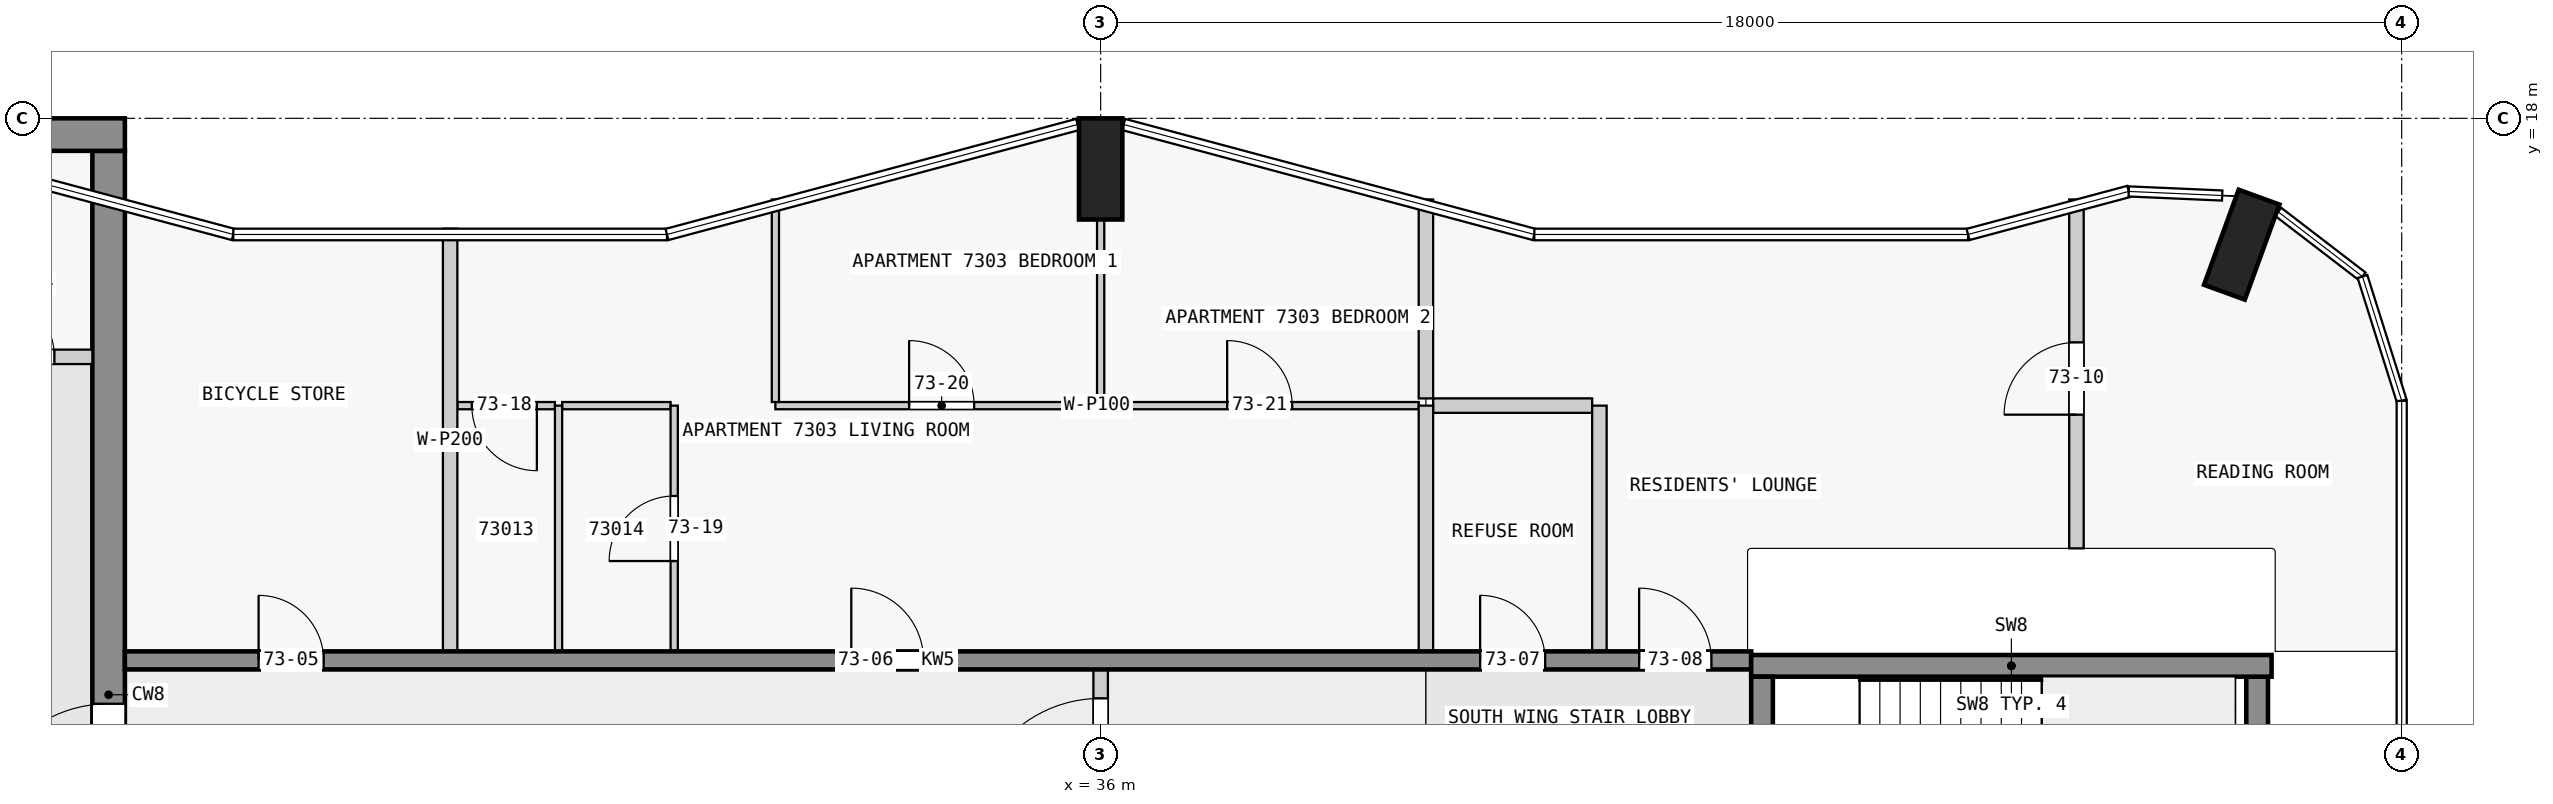
"""IFC4 building model, lengths in metres.
Left out: names, types, materials, properties, quantities, classifications, styles, units other than length and angle.
Written with IfcOpenShell. Run it as: python <this file> out.ifc"""

import sys

from ifc_helpers import new_model, si_unit, direction, frame, frame_2d, origin, origin_2d, place, context, subcontext, project, spatial, rectangle, extrude, element, fill, save


model = new_model("IFC4")
c1 = context("Model", 3, precision=1e-05, world=origin(), true_north=direction((0.0, 1.0)))
c2 = subcontext(c1, "Body", "Model", "MODEL_VIEW")
j1 = project(units=[si_unit("LENGTHUNIT", "METRE"), si_unit("PLANEANGLEUNIT", "RADIAN")], contexts=[c1])
p1 = place(None, origin())
s1 = spatial("IfcSite", under=j1, at=p1, CompositionType="ELEMENT")
p2 = place(p1, origin())
s2 = spatial("IfcBuilding", under=s1, at=p2, CompositionType="ELEMENT")
p3 = place(p2, frame((0.0, 0.0, 277.4)))
s3 = spatial("IfcBuildingStorey", under=s2, at=p3, CompositionType="ELEMENT", Elevation=277.4)
for number, where, z_axis, x_axis in (
    (1, (51.787, 16.252, 0.0), (0.0, 0.0, 1.0), (-0.94, 0.342, 0.0)),
    (2, (36.0, 17.3, 0.0), (0.0, 0.0, 1.0), (1.0, 0.0, 0.0)),
):
    element("IfcColumn", number, at=place(p3, frame(where, z_axis=z_axis, x_axis=x_axis)), inside=s3, PredefinedType="COLUMN", context=c2, shape_type="SweptSolid", body=[
        extrude(rectangle(XDim=0.6, YDim=1.4, at=origin_2d()), origin(), (0.0, 0.0, 1.0), 3.5),
    ])
p4 = place(p3, frame((1.85, 17.775, 0.0), z_axis=(0.0, 0.0, 1.0), x_axis=(1.0, 0.0, 0.0)))
e3 = element("IfcWall", 3, at=p4, inside=s3, PredefinedType="SHEAR", context=c2, shape_type="SweptSolid", body=[
    extrude(rectangle(XDim=20.65, YDim=0.45, at=frame_2d((10.325, 0.0))), origin(), (0.0, 0.0, 1.0), 3.25),
])
p5 = place(p3, frame((22.275, 2.5, 0.0), z_axis=(0.0, 0.0, 1.0), x_axis=(0.0, 1.0, 0.0)))
e4 = element("IfcWall", 4, at=p5, inside=s3, PredefinedType="SHEAR", context=c2, shape_type="SweptSolid", body=[
    extrude(rectangle(XDim=15.05, YDim=0.45, at=frame_2d((7.525, 0.0))), origin(), (0.0, 0.0, 1.0), 3.25),
])
p6 = place(p5, frame((5.6, 0.0, 0.0)))
e5 = element("IfcOpeningElement", 5, at=p6, cuts=e4, PredefinedType="OPENING", context=c2, shape_type="SweptSolid", body=[
    extrude(rectangle(XDim=1.8, YDim=2.1, at=frame_2d((0.9, 1.05))), frame((0.0, 0.235, 0.0), z_axis=(0.0, -1.0, 0.0), x_axis=(1.0, 0.0, 0.0)), (0.0, 0.0, 1.0), 0.47),
])
p7 = place(p3, frame((45.15, 7.725, 0.0), z_axis=(0.0, 0.0, 1.0), x_axis=(0.0, 1.0, 0.0)))
e6 = element("IfcWall", 6, at=p7, inside=s3, PredefinedType="SHEAR", context=c2, shape_type="SweptSolid", body=[
    extrude(rectangle(XDim=2.55, YDim=0.3, at=frame_2d((1.275, 0.0))), origin(), (0.0, 0.0, 1.0), 3.5),
])
p8 = place(p7, frame((0.725, 0.0, 0.0)))
e7 = element("IfcOpeningElement", 7, at=p8, cuts=e6, PredefinedType="OPENING", context=c2, shape_type="SweptSolid", body=[
    extrude(rectangle(XDim=1.1, YDim=2.1, at=frame_2d((0.55, 1.05))), frame((0.0, 0.16, 0.0), z_axis=(0.0, -1.0, 0.0), x_axis=(1.0, 0.0, 0.0)), (0.0, 0.0, 1.0), 0.32),
])
p9 = place(p3, frame((52.0, 7.725, 0.0), z_axis=(0.0, 0.0, 1.0), x_axis=(0.0, 1.0, 0.0)))
e8 = element("IfcWall", 8, at=p9, inside=s3, PredefinedType="SHEAR", context=c2, shape_type="SweptSolid", body=[
    extrude(rectangle(XDim=2.55, YDim=0.3, at=frame_2d((1.275, 0.0))), origin(), (0.0, 0.0, 1.0), 3.5),
])
p10 = place(p3, frame((45.0, 10.425, 0.0), z_axis=(0.0, 0.0, 1.0), x_axis=(1.0, 0.0, 0.0)))
e9 = element("IfcWall", 9, at=p10, inside=s3, PredefinedType="SHEAR", context=c2, shape_type="SweptSolid", body=[
    extrude(rectangle(XDim=7.2, YDim=0.3, at=frame_2d((3.6, 0.0))), origin(), (0.0, 0.0, 1.0), 3.5),
])
p11 = place(p3, frame((22.5, 10.5, 0.0), z_axis=(0.0, 0.0, 1.0), x_axis=(1.0, 0.0, 0.0)))
e10 = element("IfcWall", 10, at=p11, inside=s3, PredefinedType="SHEAR", context=c2, shape_type="SweptSolid", body=[
    extrude(rectangle(XDim=22.5, YDim=0.25, at=frame_2d((11.25, 0.0))), origin(), (0.0, 0.0, 1.0), 3.25),
])
p12 = place(p11, frame((1.85, 0.0, 0.0)))
e11 = element("IfcOpeningElement", 11, at=p12, cuts=e10, PredefinedType="OPENING", context=c2, shape_type="SweptSolid", body=[
    extrude(rectangle(XDim=0.9, YDim=2.1, at=frame_2d((0.45, 1.05))), frame((0.0, 0.135, 0.0), z_axis=(0.0, -1.0, 0.0), x_axis=(1.0, 0.0, 0.0)), (0.0, 0.0, 1.0), 0.27),
])
p13 = place(p11, frame((10.05, 0.0, 0.0)))
e12 = element("IfcOpeningElement", 12, at=p13, cuts=e10, PredefinedType="OPENING", context=c2, shape_type="SweptSolid", body=[
    extrude(rectangle(XDim=1.0, YDim=2.1, at=frame_2d((0.5, 1.05))), frame((0.0, 0.135, 0.0), z_axis=(0.0, -1.0, 0.0), x_axis=(1.0, 0.0, 0.0)), (0.0, 0.0, 1.0), 0.27),
])
p14 = place(p11, frame((18.75, 0.0, 0.0)))
e13 = element("IfcOpeningElement", 13, at=p14, cuts=e10, PredefinedType="OPENING", context=c2, shape_type="SweptSolid", body=[
    extrude(rectangle(XDim=0.9, YDim=2.1, at=frame_2d((0.45, 1.05))), frame((0.0, 0.135, 0.0), z_axis=(0.0, -1.0, 0.0), x_axis=(1.0, 0.0, 0.0)), (0.0, 0.0, 1.0), 0.27),
])
p15 = place(p11, frame((20.95, 0.0, 0.0)))
e14 = element("IfcOpeningElement", 14, at=p15, cuts=e10, PredefinedType="OPENING", context=c2, shape_type="SweptSolid", body=[
    extrude(rectangle(XDim=1.0, YDim=2.1, at=frame_2d((0.5, 1.05))), frame((0.0, 0.135, 0.0), z_axis=(0.0, -1.0, 0.0), x_axis=(1.0, 0.0, 0.0)), (0.0, 0.0, 1.0), 0.27),
])
p16 = place(p3, frame((18.6, 14.7, 0.0), z_axis=(0.0, 0.0, 1.0), x_axis=(1.0, 0.0, 0.0)))
e15 = element("IfcWall", 15, at=p16, inside=s3, PredefinedType="PARTITIONING", context=c2, shape_type="SweptSolid", body=[
    extrude(rectangle(XDim=3.45, YDim=0.2, at=frame_2d((1.725, 0.0))), origin(), (0.0, 0.0, 1.0), 3.25),
])
p17 = place(p16, frame((0.3, 0.0, 0.0)))
e16 = element("IfcOpeningElement", 16, at=p17, cuts=e15, PredefinedType="OPENING", context=c2, shape_type="SweptSolid", body=[
    extrude(rectangle(XDim=0.9, YDim=2.1, at=frame_2d((0.45, 1.05))), frame((0.0, 0.11, 0.0), z_axis=(0.0, -1.0, 0.0), x_axis=(1.0, 0.0, 0.0)), (0.0, 0.0, 1.0), 0.22),
])
p18 = place(p16, frame((2.025, 0.0, 0.0)))
e17 = element("IfcOpeningElement", 17, at=p18, cuts=e15, PredefinedType="OPENING", context=c2, shape_type="SweptSolid", body=[
    extrude(rectangle(XDim=0.9, YDim=2.1, at=frame_2d((0.45, 1.05))), frame((0.0, 0.11, 0.0), z_axis=(0.0, -1.0, 0.0), x_axis=(1.0, 0.0, 0.0)), (0.0, 0.0, 1.0), 0.22),
])
p19 = place(p3, frame((28.45, 14.025, 0.0), z_axis=(0.0, 0.0, 1.0), x_axis=(-1.0, 0.0, 0.0)))
e18 = element("IfcWall", 18, at=p19, inside=s3, PredefinedType="PARTITIONING", context=c2, shape_type="SweptSolid", body=[
    extrude(rectangle(XDim=1.35, YDim=0.1, at=frame_2d((0.675, 0.0))), origin(), (0.0, 0.0, 1.0), 3.25),
])
p20 = place(p19, frame((0.25, 0.0, 0.0)))
e19 = element("IfcOpeningElement", 19, at=p20, cuts=e18, PredefinedType="OPENING", context=c2, shape_type="SweptSolid", body=[
    extrude(rectangle(XDim=0.9, YDim=2.1, at=frame_2d((0.45, 1.05))), frame((0.0, 0.06, 0.0), z_axis=(0.0, -1.0, 0.0), x_axis=(1.0, 0.0, 0.0)), (0.0, 0.0, 1.0), 0.12),
])
p21 = place(p3, frame((30.05, 14.025, 0.0), z_axis=(0.0, 0.0, 1.0), x_axis=(-1.0, 0.0, 0.0)))
e20 = element("IfcWall", 20, at=p21, inside=s3, PredefinedType="PARTITIONING", context=c2, shape_type="SweptSolid", body=[
    extrude(rectangle(XDim=1.5, YDim=0.1, at=frame_2d((0.75, 0.0))), origin(), (0.0, 0.0, 1.0), 3.25),
])
p22 = place(p3, frame((31.5, 14.025, 0.0), z_axis=(0.0, 0.0, 1.0), x_axis=(1.0, 0.0, 0.0)))
e21 = element("IfcWall", 21, at=p22, inside=s3, PredefinedType="PARTITIONING", context=c2, shape_type="SweptSolid", body=[
    extrude(rectangle(XDim=8.9, YDim=0.1, at=frame_2d((4.45, 0.0))), origin(), (0.0, 0.0, 1.0), 3.25),
])
p23 = place(p22, frame((1.85, 0.0, 0.0)))
e22 = element("IfcOpeningElement", 22, at=p23, cuts=e21, PredefinedType="OPENING", context=c2, shape_type="SweptSolid", body=[
    extrude(rectangle(XDim=0.9, YDim=2.1, at=frame_2d((0.45, 1.05))), frame((0.0, 0.06, 0.0), z_axis=(0.0, -1.0, 0.0), x_axis=(1.0, 0.0, 0.0)), (0.0, 0.0, 1.0), 0.12),
])
p24 = place(p22, frame((6.25, 0.0, 0.0)))
e23 = element("IfcOpeningElement", 23, at=p24, cuts=e21, PredefinedType="OPENING", context=c2, shape_type="SweptSolid", body=[
    extrude(rectangle(XDim=0.9, YDim=2.1, at=frame_2d((0.45, 1.05))), frame((0.0, 0.06, 0.0), z_axis=(0.0, -1.0, 0.0), x_axis=(1.0, 0.0, 0.0)), (0.0, 0.0, 1.0), 0.12),
])
p25 = place(p3, frame((42.8, 14.025, 0.0), z_axis=(0.0, 0.0, 1.0), x_axis=(-1.0, 0.0, 0.0)))
e24 = element("IfcWall", 24, at=p25, inside=s3, PredefinedType="PARTITIONING", context=c2, shape_type="SweptSolid", body=[
    extrude(rectangle(XDim=2.2, YDim=0.2, at=frame_2d((1.1, 0.0))), origin(), (0.0, 0.0, 1.0), 3.25),
])
p26 = place(p3, frame((27.0, 10.625, 0.0), z_axis=(0.0, 0.0, 1.0), x_axis=(0.0, 1.0, 0.0)))
e25 = element("IfcWall", 25, at=p26, inside=s3, PredefinedType="PARTITIONING", context=c2, shape_type="SweptSolid", body=[
    extrude(rectangle(XDim=5.848, YDim=0.2, at=frame_2d((2.924, 0.0))), origin(), (0.0, 0.0, 1.0), 3.25),
])
p27 = place(p3, frame((28.5, 10.625, 0.0), z_axis=(0.0, 0.0, 1.0), x_axis=(0.0, 1.0, 0.0)))
e26 = element("IfcWall", 26, at=p27, inside=s3, PredefinedType="PARTITIONING", context=c2, shape_type="SweptSolid", body=[
    extrude(rectangle(XDim=3.4, YDim=0.1, at=frame_2d((1.7, 0.0))), origin(), (0.0, 0.0, 1.0), 3.25),
])
p28 = place(p3, frame((30.1, 10.625, 0.0), z_axis=(0.0, 0.0, 1.0), x_axis=(0.0, 1.0, 0.0)))
e27 = element("IfcWall", 27, at=p28, inside=s3, PredefinedType="PARTITIONING", context=c2, shape_type="SweptSolid", body=[
    extrude(rectangle(XDim=3.4, YDim=0.1, at=frame_2d((1.7, 0.0))), origin(), (0.0, 0.0, 1.0), 3.25),
])
p29 = place(p28, frame((1.25, 0.0, 0.0)))
e28 = element("IfcOpeningElement", 28, at=p29, cuts=e27, PredefinedType="OPENING", context=c2, shape_type="SweptSolid", body=[
    extrude(rectangle(XDim=0.9, YDim=2.1, at=frame_2d((0.45, 1.05))), frame((0.0, 0.06, 0.0), z_axis=(0.0, -1.0, 0.0), x_axis=(1.0, 0.0, 0.0)), (0.0, 0.0, 1.0), 0.12),
])
p30 = place(p3, frame((31.5, 16.878, 0.0), z_axis=(0.0, 0.0, 1.0), x_axis=(0.0, -1.0, 0.0)))
e29 = element("IfcWall", 29, at=p30, inside=s3, PredefinedType="PARTITIONING", context=c2, shape_type="SweptSolid", body=[
    extrude(rectangle(XDim=2.803, YDim=0.1, at=frame_2d((1.401, 0.0))), origin(), (0.0, 0.0, 1.0), 3.25),
])
p31 = place(p3, frame((36.0, 14.075, 0.0), z_axis=(0.0, 0.0, 1.0), x_axis=(0.0, 1.0, 0.0)))
e30 = element("IfcWall", 30, at=p31, inside=s3, PredefinedType="PARTITIONING", context=c2, shape_type="SweptSolid", body=[
    extrude(rectangle(XDim=2.525, YDim=0.1, at=frame_2d((1.263, 0.0))), origin(), (0.0, 0.0, 1.0), 3.25),
])
p32 = place(p3, frame((40.5, 14.025, 0.0), z_axis=(0.0, 0.0, 1.0), x_axis=(0.0, -1.0, 0.0)))
e31 = element("IfcWall", 31, at=p32, inside=s3, PredefinedType="PARTITIONING", context=c2, shape_type="SweptSolid", body=[
    extrude(rectangle(XDim=3.4, YDim=0.2, at=frame_2d((1.7, 0.0))), origin(), (0.0, 0.0, 1.0), 3.25),
])
p33 = place(p3, frame((40.5, 14.125, 0.0), z_axis=(0.0, 0.0, 1.0), x_axis=(0.0, 1.0, 0.0)))
e32 = element("IfcWall", 32, at=p33, inside=s3, PredefinedType="PARTITIONING", context=c2, shape_type="SweptSolid", body=[
    extrude(rectangle(XDim=2.753, YDim=0.2, at=frame_2d((1.376, 0.0))), origin(), (0.0, 0.0, 1.0), 3.25),
])
p34 = place(p3, frame((42.9, 10.625, 0.0), z_axis=(0.0, 0.0, 1.0), x_axis=(0.0, 1.0, 0.0)))
e33 = element("IfcWall", 33, at=p34, inside=s3, PredefinedType="PARTITIONING", context=c2, shape_type="SweptSolid", body=[
    extrude(rectangle(XDim=3.4, YDim=0.2, at=frame_2d((1.7, 0.0))), origin(), (0.0, 0.0, 1.0), 3.25),
])
p35 = place(p3, frame((49.5, 12.05, 0.0), z_axis=(0.0, 0.0, 1.0), x_axis=(0.0, 1.0, 0.0)))
e34 = element("IfcWall", 34, at=p35, inside=s3, PredefinedType="PARTITIONING", context=c2, shape_type="SweptSolid", body=[
    extrude(rectangle(XDim=4.828, YDim=0.2, at=frame_2d((2.414, 0.0))), origin(), (0.0, 0.0, 1.0), 3.25),
])
p36 = place(p35, frame((1.85, 0.0, 0.0)))
e35 = element("IfcOpeningElement", 35, at=p36, cuts=e34, PredefinedType="OPENING", context=c2, shape_type="SweptSolid", body=[
    extrude(rectangle(XDim=1.0, YDim=2.1, at=frame_2d((0.5, 1.05))), frame((0.0, 0.11, 0.0), z_axis=(0.0, -1.0, 0.0), x_axis=(1.0, 0.0, 0.0)), (0.0, 0.0, 1.0), 0.22),
])
p37 = place(p3, frame((36.0, 7.475, 0.0), z_axis=(0.0, 0.0, 1.0), x_axis=(0.0, 1.0, 0.0)))
e36 = element("IfcWall", 36, at=p37, inside=s3, PredefinedType="PARTITIONING", context=c2, shape_type="SweptSolid", body=[
    extrude(rectangle(XDim=3.15, YDim=0.2, at=frame_2d((1.575, 0.0))), origin(), (0.0, 0.0, 1.0), 3.25),
])
p38 = place(p37, frame((0.7, 0.0, 0.0)))
e37 = element("IfcOpeningElement", 37, at=p38, cuts=e36, PredefinedType="OPENING", context=c2, shape_type="SweptSolid", body=[
    extrude(rectangle(XDim=1.8, YDim=2.1, at=frame_2d((0.9, 1.05))), frame((0.0, 0.11, 0.0), z_axis=(0.0, -1.0, 0.0), x_axis=(1.0, 0.0, 0.0)), (0.0, 0.0, 1.0), 0.22),
])
p39 = place(p6, origin())
e38 = element("IfcDoor", 38, at=p39, inside=s3, OperationType="DOUBLE_DOOR_SINGLE_SWING", PredefinedType="DOOR", context=c2, shape_type="SweptSolid", body=[
    extrude(rectangle(XDim=1.8, YDim=2.1, at=frame_2d((0.9, 1.05))), frame((0.0, 0.025, 0.0), z_axis=(0.0, -1.0, 0.0), x_axis=(1.0, 0.0, 0.0)), (0.0, 0.0, 1.0), 0.05),
])
fill(e5, e38)
p40 = place(p18, origin())
e39 = element("IfcDoor", 39, at=p40, inside=s3, OperationType="SINGLE_SWING_LEFT", PredefinedType="DOOR", context=c2, shape_type="SweptSolid", body=[
    extrude(rectangle(XDim=0.9, YDim=2.1, at=frame_2d((0.45, 1.05))), frame((0.0, 0.025, 0.0), z_axis=(0.0, -1.0, 0.0), x_axis=(1.0, 0.0, 0.0)), (0.0, 0.0, 1.0), 0.05),
])
fill(e17, e39)
p41 = place(p12, origin())
e40 = element("IfcDoor", 40, at=p41, inside=s3, OperationType="SINGLE_SWING_LEFT", PredefinedType="DOOR", context=c2, shape_type="SweptSolid", body=[
    extrude(rectangle(XDim=0.9, YDim=2.1, at=frame_2d((0.45, 1.05))), frame((0.0, 0.025, 0.0), z_axis=(0.0, -1.0, 0.0), x_axis=(1.0, 0.0, 0.0)), (0.0, 0.0, 1.0), 0.05),
])
fill(e11, e40)
p42 = place(p13, origin())
e41 = element("IfcDoor", 41, at=p42, inside=s3, OperationType="SINGLE_SWING_LEFT", PredefinedType="DOOR", context=c2, shape_type="SweptSolid", body=[
    extrude(rectangle(XDim=1.0, YDim=2.1, at=frame_2d((0.5, 1.05))), frame((0.0, 0.025, 0.0), z_axis=(0.0, -1.0, 0.0), x_axis=(1.0, 0.0, 0.0)), (0.0, 0.0, 1.0), 0.05),
])
fill(e12, e41)
p43 = place(p14, origin())
e42 = element("IfcDoor", 42, at=p43, inside=s3, OperationType="SINGLE_SWING_RIGHT", PredefinedType="DOOR", context=c2, shape_type="SweptSolid", body=[
    extrude(rectangle(XDim=0.9, YDim=2.1, at=frame_2d((0.45, 1.05))), frame((0.0, 0.025, 0.0), z_axis=(0.0, -1.0, 0.0), x_axis=(1.0, 0.0, 0.0)), (0.0, 0.0, 1.0), 0.05),
])
fill(e13, e42)
p44 = place(p15, origin())
e43 = element("IfcDoor", 43, at=p44, inside=s3, OperationType="SINGLE_SWING_RIGHT", PredefinedType="DOOR", context=c2, shape_type="SweptSolid", body=[
    extrude(rectangle(XDim=1.0, YDim=2.1, at=frame_2d((0.5, 1.05))), frame((0.0, 0.025, 0.0), z_axis=(0.0, -1.0, 0.0), x_axis=(1.0, 0.0, 0.0)), (0.0, 0.0, 1.0), 0.05),
])
fill(e14, e43)
p45 = place(p38, origin())
e44 = element("IfcDoor", 44, at=p45, inside=s3, OperationType="SINGLE_SWING_RIGHT", PredefinedType="DOOR", context=c2, shape_type="SweptSolid", body=[
    extrude(rectangle(XDim=1.8, YDim=2.1, at=frame_2d((0.9, 1.05))), frame((0.0, 0.025, 0.0), z_axis=(0.0, -1.0, 0.0), x_axis=(1.0, 0.0, 0.0)), (0.0, 0.0, 1.0), 0.05),
])
fill(e37, e44)
p46 = place(p36, origin())
e45 = element("IfcDoor", 45, at=p46, inside=s3, OperationType="SINGLE_SWING_LEFT", PredefinedType="DOOR", context=c2, shape_type="SweptSolid", body=[
    extrude(rectangle(XDim=1.0, YDim=2.1, at=frame_2d((0.5, 1.05))), frame((0.0, 0.025, 0.0), z_axis=(0.0, -1.0, 0.0), x_axis=(1.0, 0.0, 0.0)), (0.0, 0.0, 1.0), 0.05),
])
fill(e35, e45)
p47 = place(p20, origin())
e46 = element("IfcDoor", 46, at=p47, inside=s3, OperationType="SINGLE_SWING_RIGHT", PredefinedType="DOOR", context=c2, shape_type="SweptSolid", body=[
    extrude(rectangle(XDim=0.9, YDim=2.1, at=frame_2d((0.45, 1.05))), frame((0.0, 0.025, 0.0), z_axis=(0.0, -1.0, 0.0), x_axis=(1.0, 0.0, 0.0)), (0.0, 0.0, 1.0), 0.05),
])
fill(e19, e46)
p48 = place(p29, origin())
e47 = element("IfcDoor", 47, at=p48, inside=s3, OperationType="SINGLE_SWING_LEFT", PredefinedType="DOOR", context=c2, shape_type="SweptSolid", body=[
    extrude(rectangle(XDim=0.9, YDim=2.1, at=frame_2d((0.45, 1.05))), frame((0.0, 0.025, 0.0), z_axis=(0.0, -1.0, 0.0), x_axis=(1.0, 0.0, 0.0)), (0.0, 0.0, 1.0), 0.05),
])
fill(e28, e47)
p49 = place(p23, origin())
e48 = element("IfcDoor", 48, at=p49, inside=s3, OperationType="SINGLE_SWING_LEFT", PredefinedType="DOOR", context=c2, shape_type="SweptSolid", body=[
    extrude(rectangle(XDim=0.9, YDim=2.1, at=frame_2d((0.45, 1.05))), frame((0.0, 0.025, 0.0), z_axis=(0.0, -1.0, 0.0), x_axis=(1.0, 0.0, 0.0)), (0.0, 0.0, 1.0), 0.05),
])
fill(e22, e48)
p50 = place(p24, origin())
e49 = element("IfcDoor", 49, at=p50, inside=s3, OperationType="SINGLE_SWING_RIGHT", PredefinedType="DOOR", context=c2, shape_type="SweptSolid", body=[
    extrude(rectangle(XDim=0.9, YDim=2.1, at=frame_2d((0.45, 1.05))), frame((0.0, 0.025, 0.0), z_axis=(0.0, -1.0, 0.0), x_axis=(1.0, 0.0, 0.0)), (0.0, 0.0, 1.0), 0.05),
])
fill(e23, e49)
save(model, sys.argv[1])
